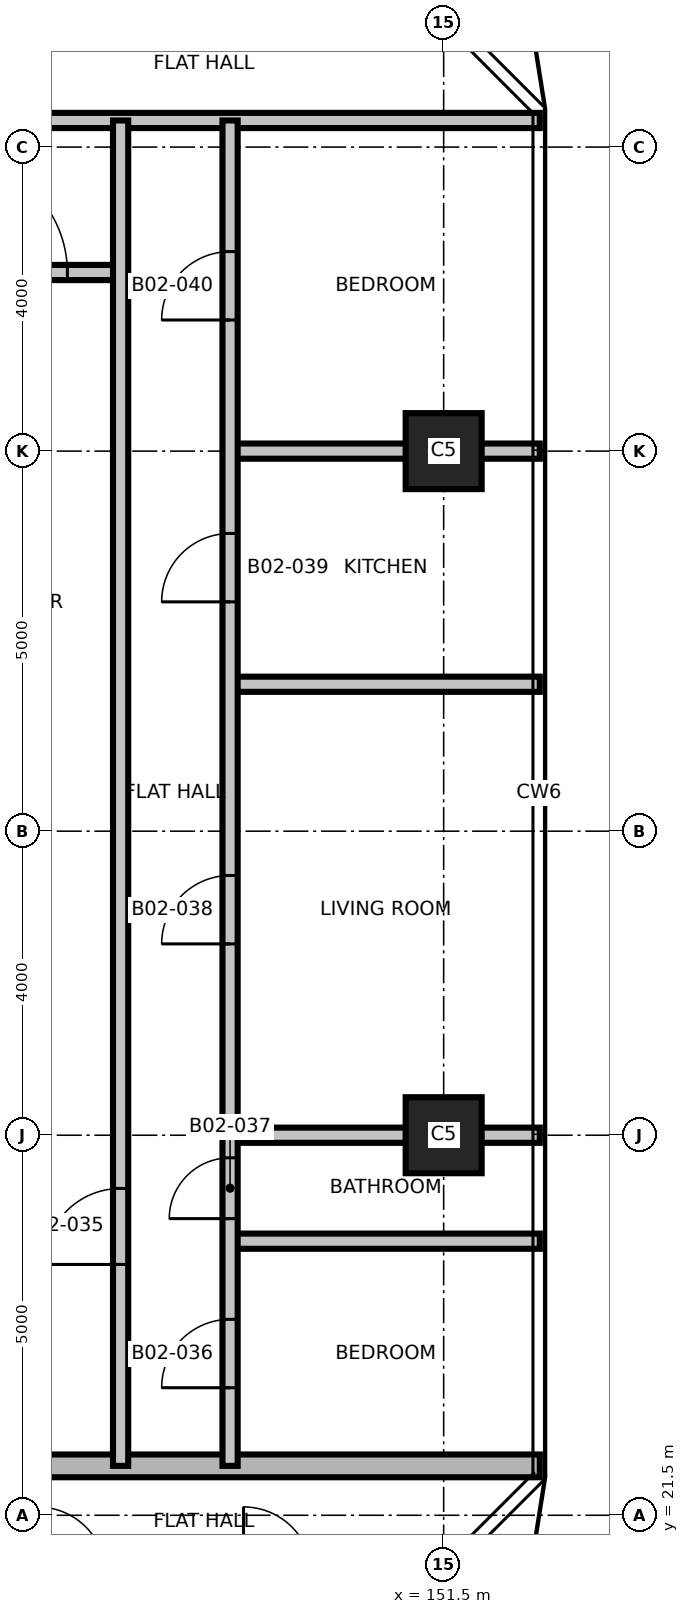
"""IFC4 building model, lengths in metres.
Left out: names, types, materials, properties, quantities, classifications, styles, units other than length and angle.
Written with IfcOpenShell. Run it as: python <this file> out.ifc"""

import sys

from ifc_helpers import new_model, si_unit, direction, frame, frame_2d, origin, origin_2d, place, context, subcontext, project, spatial, rectangle, extrude, element, fill, save


model = new_model("IFC4")
c1 = context("Model", 3, precision=1e-05, world=origin(), true_north=direction((0.0, 1.0)))
c2 = subcontext(c1, "Body", "Model", "MODEL_VIEW")
j1 = project(units=[si_unit("LENGTHUNIT", "METRE"), si_unit("PLANEANGLEUNIT", "RADIAN")], contexts=[c1])
p1 = place(None, origin())
s1 = spatial("IfcSite", under=j1, at=p1, CompositionType="ELEMENT")
p2 = place(p1, origin())
s2 = spatial("IfcBuilding", under=s1, at=p2, CompositionType="ELEMENT")
p3 = place(p2, frame((0.0, 0.0, 48.3)))
s3 = spatial("IfcBuildingStorey", under=s2, at=p3, CompositionType="ELEMENT", Elevation=48.3)
for number, where, z_axis, x_axis in (
    (1, (151.5, 26.5, 0.0), (0.0, 0.0, 1.0), (1.0, 0.0, 0.0)),
    (2, (151.5, 35.5, 0.0), (0.0, 0.0, 1.0), (1.0, 0.0, 0.0)),
):
    element("IfcColumn", number, at=place(p3, frame(where, z_axis=z_axis, x_axis=x_axis)), inside=s3, PredefinedType="COLUMN", context=c2, shape_type="SweptSolid", body=[
        extrude(rectangle(XDim=1.0, YDim=1.0, at=origin_2d()), origin(), (0.0, 0.0, 1.0), 3.7),
    ])
p4 = place(p3, frame((120.235, 22.15, 0.0), z_axis=(0.0, 0.0, 1.0), x_axis=(1.0, 0.0, 0.0)))
e3 = element("IfcWall", 3, at=p4, inside=s3, PredefinedType="SHEAR", context=c2, shape_type="SweptSolid", body=[
    extrude(rectangle(XDim=32.53, YDim=0.3, at=frame_2d((16.265, 0.0))), origin(), (0.0, 0.0, 1.0), 3.4),
])
p5 = place(p4, frame((22.515, 0.0, 0.0)))
e4 = element("IfcOpeningElement", 4, at=p5, cuts=e3, PredefinedType="OPENING", context=c2, shape_type="SweptSolid", body=[
    extrude(rectangle(XDim=1.0, YDim=2.1, at=frame_2d((0.5, 1.05))), frame((0.0, 0.16, 0.0), z_axis=(0.0, -1.0, 0.0), x_axis=(1.0, 0.0, 0.0)), (0.0, 0.0, 1.0), 0.32),
])
p6 = place(p4, frame((10.865, 0.0, 0.0)))
e5 = element("IfcOpeningElement", 5, at=p6, cuts=e3, PredefinedType="OPENING", context=c2, shape_type="SweptSolid", body=[
    extrude(rectangle(XDim=1.0, YDim=2.1, at=frame_2d((0.5, 1.05))), frame((0.0, 0.16, 0.0), z_axis=(0.0, -1.0, 0.0), x_axis=(1.0, 0.0, 0.0)), (0.0, 0.0, 1.0), 0.32),
])
p7 = place(p4, frame((24.415, 0.0, 0.0)))
e6 = element("IfcOpeningElement", 6, at=p7, cuts=e3, PredefinedType="OPENING", context=c2, shape_type="SweptSolid", body=[
    extrude(rectangle(XDim=1.0, YDim=2.1, at=frame_2d((0.5, 1.05))), frame((0.0, 0.16, 0.0), z_axis=(0.0, -1.0, 0.0), x_axis=(1.0, 0.0, 0.0)), (0.0, 0.0, 1.0), 0.32),
])
p8 = place(p4, frame((16.515, 0.0, 0.0)))
e7 = element("IfcOpeningElement", 7, at=p8, cuts=e3, PredefinedType="OPENING", context=c2, shape_type="SweptSolid", body=[
    extrude(rectangle(XDim=0.9, YDim=2.1, at=frame_2d((0.45, 1.05))), frame((0.0, 0.16, 0.0), z_axis=(0.0, -1.0, 0.0), x_axis=(1.0, 0.0, 0.0)), (0.0, 0.0, 1.0), 0.32),
])
for number, where, z_axis, x_axis in (
    (8, (148.69, 25.106, 0.0), (0.0, 0.0, 1.0), (1.0, 0.0, 0.0)),
    (9, (148.69, 26.5, 0.0), (0.0, 0.0, 1.0), (1.0, 0.0, 0.0)),
    (10, (148.69, 32.433, 0.0), (0.0, 0.0, 1.0), (1.0, 0.0, 0.0)),
    (11, (148.69, 35.5, 0.0), (0.0, 0.0, 1.0), (1.0, 0.0, 0.0)),
):
    element("IfcWall", number, at=place(p3, frame(where, z_axis=z_axis, x_axis=x_axis)), inside=s3, PredefinedType="PARTITIONING", context=c2, shape_type="SweptSolid", body=[
        extrude(rectangle(XDim=4.075, YDim=0.2, at=frame_2d((2.038, 0.0))), origin(), (0.0, 0.0, 1.0), 3.4),
    ])
p9 = place(p3, frame((144.02, 37.85, 0.0), z_axis=(0.0, 0.0, 1.0), x_axis=(1.0, 0.0, 0.0)))
e12 = element("IfcWall", 12, at=p9, inside=s3, PredefinedType="PARTITIONING", context=c2, shape_type="SweptSolid", body=[
    extrude(rectangle(XDim=3.23, YDim=0.2, at=frame_2d((1.615, 0.0))), origin(), (0.0, 0.0, 1.0), 3.4),
])
p10 = place(p9, frame((1.03, 0.0, 0.0)))
e13 = element("IfcOpeningElement", 13, at=p10, cuts=e12, PredefinedType="OPENING", context=c2, shape_type="SweptSolid", body=[
    extrude(rectangle(XDim=1.5, YDim=2.1, at=frame_2d((0.75, 1.05))), frame((0.0, 0.11, 0.0), z_axis=(0.0, -1.0, 0.0), x_axis=(1.0, 0.0, 0.0)), (0.0, 0.0, 1.0), 0.22),
])
p11 = place(p3, frame((120.235, 39.85, 0.0), z_axis=(0.0, 0.0, 1.0), x_axis=(1.0, 0.0, 0.0)))
e14 = element("IfcWall", 14, at=p11, inside=s3, PredefinedType="PARTITIONING", context=c2, shape_type="SweptSolid", body=[
    extrude(rectangle(XDim=32.53, YDim=0.2, at=frame_2d((16.265, 0.0))), origin(), (0.0, 0.0, 1.0), 3.4),
])
p12 = place(p11, frame((7.115, 0.0, 0.0)))
e15 = element("IfcOpeningElement", 15, at=p12, cuts=e14, PredefinedType="OPENING", context=c2, shape_type="SweptSolid", body=[
    extrude(rectangle(XDim=1.0, YDim=2.1, at=frame_2d((0.5, 1.05))), frame((0.0, 0.11, 0.0), z_axis=(0.0, -1.0, 0.0), x_axis=(1.0, 0.0, 0.0)), (0.0, 0.0, 1.0), 0.22),
])
p13 = place(p11, frame((15.765, 0.0, 0.0)))
e16 = element("IfcOpeningElement", 16, at=p13, cuts=e14, PredefinedType="OPENING", context=c2, shape_type="SweptSolid", body=[
    extrude(rectangle(XDim=1.0, YDim=2.1, at=frame_2d((0.5, 1.05))), frame((0.0, 0.11, 0.0), z_axis=(0.0, -1.0, 0.0), x_axis=(1.0, 0.0, 0.0)), (0.0, 0.0, 1.0), 0.22),
])
p14 = place(p11, frame((24.415, 0.0, 0.0)))
e17 = element("IfcOpeningElement", 17, at=p14, cuts=e14, PredefinedType="OPENING", context=c2, shape_type="SweptSolid", body=[
    extrude(rectangle(XDim=1.0, YDim=2.1, at=frame_2d((0.5, 1.05))), frame((0.0, 0.11, 0.0), z_axis=(0.0, -1.0, 0.0), x_axis=(1.0, 0.0, 0.0)), (0.0, 0.0, 1.0), 0.22),
])
p15 = place(p3, frame((147.25, 22.15, 0.0), z_axis=(0.0, 0.0, 1.0), x_axis=(0.0, 1.0, 0.0)))
e18 = element("IfcWall", 18, at=p15, inside=s3, PredefinedType="PARTITIONING", context=c2, shape_type="SweptSolid", body=[
    extrude(rectangle(XDim=17.7, YDim=0.2, at=frame_2d((8.85, 0.0))), origin(), (0.0, 0.0, 1.0), 3.4),
])
p16 = place(p15, frame((2.65, 0.0, 0.0)))
e19 = element("IfcOpeningElement", 19, at=p16, cuts=e18, PredefinedType="OPENING", context=c2, shape_type="SweptSolid", body=[
    extrude(rectangle(XDim=1.0, YDim=2.1, at=frame_2d((0.5, 1.05))), frame((0.0, 0.11, 0.0), z_axis=(0.0, -1.0, 0.0), x_axis=(1.0, 0.0, 0.0)), (0.0, 0.0, 1.0), 0.22),
])
p17 = place(p3, frame((148.69, 22.15, 0.0), z_axis=(0.0, 0.0, 1.0), x_axis=(0.0, 1.0, 0.0)))
e20 = element("IfcWall", 20, at=p17, inside=s3, PredefinedType="PARTITIONING", context=c2, shape_type="SweptSolid", body=[
    extrude(rectangle(XDim=17.7, YDim=0.2, at=frame_2d((8.85, 0.0))), origin(), (0.0, 0.0, 1.0), 3.4),
])
p18 = place(p17, frame((1.028, 0.0, 0.0)))
e21 = element("IfcOpeningElement", 21, at=p18, cuts=e20, PredefinedType="OPENING", context=c2, shape_type="SweptSolid", body=[
    extrude(rectangle(XDim=0.9, YDim=2.1, at=frame_2d((0.45, 1.05))), frame((0.0, 0.11, 0.0), z_axis=(0.0, -1.0, 0.0), x_axis=(1.0, 0.0, 0.0)), (0.0, 0.0, 1.0), 0.22),
])
p19 = place(p17, frame((3.253, 0.0, 0.0)))
e22 = element("IfcOpeningElement", 22, at=p19, cuts=e20, PredefinedType="OPENING", context=c2, shape_type="SweptSolid", body=[
    extrude(rectangle(XDim=0.8, YDim=2.1, at=frame_2d((0.4, 1.05))), frame((0.0, 0.11, 0.0), z_axis=(0.0, -1.0, 0.0), x_axis=(1.0, 0.0, 0.0)), (0.0, 0.0, 1.0), 0.22),
])
p20 = place(p17, frame((6.867, 0.0, 0.0)))
e23 = element("IfcOpeningElement", 23, at=p20, cuts=e20, PredefinedType="OPENING", context=c2, shape_type="SweptSolid", body=[
    extrude(rectangle(XDim=0.9, YDim=2.1, at=frame_2d((0.45, 1.05))), frame((0.0, 0.11, 0.0), z_axis=(0.0, -1.0, 0.0), x_axis=(1.0, 0.0, 0.0)), (0.0, 0.0, 1.0), 0.22),
])
p21 = place(p17, frame((11.367, 0.0, 0.0)))
e24 = element("IfcOpeningElement", 24, at=p21, cuts=e20, PredefinedType="OPENING", context=c2, shape_type="SweptSolid", body=[
    extrude(rectangle(XDim=0.9, YDim=2.1, at=frame_2d((0.45, 1.05))), frame((0.0, 0.11, 0.0), z_axis=(0.0, -1.0, 0.0), x_axis=(1.0, 0.0, 0.0)), (0.0, 0.0, 1.0), 0.22),
])
p22 = place(p17, frame((15.075, 0.0, 0.0)))
e25 = element("IfcOpeningElement", 25, at=p22, cuts=e20, PredefinedType="OPENING", context=c2, shape_type="SweptSolid", body=[
    extrude(rectangle(XDim=0.9, YDim=2.1, at=frame_2d((0.45, 1.05))), frame((0.0, 0.11, 0.0), z_axis=(0.0, -1.0, 0.0), x_axis=(1.0, 0.0, 0.0)), (0.0, 0.0, 1.0), 0.22),
])
p23 = place(p10, origin())
e26 = element("IfcDoor", 26, at=p23, inside=s3, OperationType="SINGLE_SWING_LEFT", PredefinedType="DOOR", context=c2, shape_type="SweptSolid", body=[
    extrude(rectangle(XDim=1.5, YDim=2.1, at=frame_2d((0.75, 1.05))), frame((0.0, 0.025, 0.0), z_axis=(0.0, -1.0, 0.0), x_axis=(1.0, 0.0, 0.0)), (0.0, 0.0, 1.0), 0.05),
])
fill(e13, e26)
p24 = place(p16, origin())
e27 = element("IfcDoor", 27, at=p24, inside=s3, OperationType="SINGLE_SWING_LEFT", PredefinedType="DOOR", context=c2, shape_type="SweptSolid", body=[
    extrude(rectangle(XDim=1.0, YDim=2.1, at=frame_2d((0.5, 1.05))), frame((0.0, 0.025, 0.0), z_axis=(0.0, -1.0, 0.0), x_axis=(1.0, 0.0, 0.0)), (0.0, 0.0, 1.0), 0.05),
])
fill(e19, e27)
p25 = place(p18, origin())
e28 = element("IfcDoor", 28, at=p25, inside=s3, OperationType="SINGLE_SWING_RIGHT", PredefinedType="DOOR", context=c2, shape_type="SweptSolid", body=[
    extrude(rectangle(XDim=0.9, YDim=2.1, at=frame_2d((0.45, 1.05))), frame((0.0, 0.025, 0.0), z_axis=(0.0, -1.0, 0.0), x_axis=(1.0, 0.0, 0.0)), (0.0, 0.0, 1.0), 0.05),
])
fill(e21, e28)
p26 = place(p19, origin())
e29 = element("IfcDoor", 29, at=p26, inside=s3, OperationType="SINGLE_SWING_LEFT", PredefinedType="DOOR", context=c2, shape_type="SweptSolid", body=[
    extrude(rectangle(XDim=0.8, YDim=2.1, at=frame_2d((0.4, 1.05))), frame((0.0, 0.025, 0.0), z_axis=(0.0, -1.0, 0.0), x_axis=(1.0, 0.0, 0.0)), (0.0, 0.0, 1.0), 0.05),
])
fill(e22, e29)
p27 = place(p20, origin())
e30 = element("IfcDoor", 30, at=p27, inside=s3, OperationType="SINGLE_SWING_RIGHT", PredefinedType="DOOR", context=c2, shape_type="SweptSolid", body=[
    extrude(rectangle(XDim=0.9, YDim=2.1, at=frame_2d((0.45, 1.05))), frame((0.0, 0.025, 0.0), z_axis=(0.0, -1.0, 0.0), x_axis=(1.0, 0.0, 0.0)), (0.0, 0.0, 1.0), 0.05),
])
fill(e23, e30)
p28 = place(p21, origin())
e31 = element("IfcDoor", 31, at=p28, inside=s3, OperationType="SINGLE_SWING_LEFT", PredefinedType="DOOR", context=c2, shape_type="SweptSolid", body=[
    extrude(rectangle(XDim=0.9, YDim=2.1, at=frame_2d((0.45, 1.05))), frame((0.0, 0.025, 0.0), z_axis=(0.0, -1.0, 0.0), x_axis=(1.0, 0.0, 0.0)), (0.0, 0.0, 1.0), 0.05),
])
fill(e24, e31)
p29 = place(p22, origin())
e32 = element("IfcDoor", 32, at=p29, inside=s3, OperationType="SINGLE_SWING_RIGHT", PredefinedType="DOOR", context=c2, shape_type="SweptSolid", body=[
    extrude(rectangle(XDim=0.9, YDim=2.1, at=frame_2d((0.45, 1.05))), frame((0.0, 0.025, 0.0), z_axis=(0.0, -1.0, 0.0), x_axis=(1.0, 0.0, 0.0)), (0.0, 0.0, 1.0), 0.05),
])
fill(e25, e32)
save(model, sys.argv[1])
